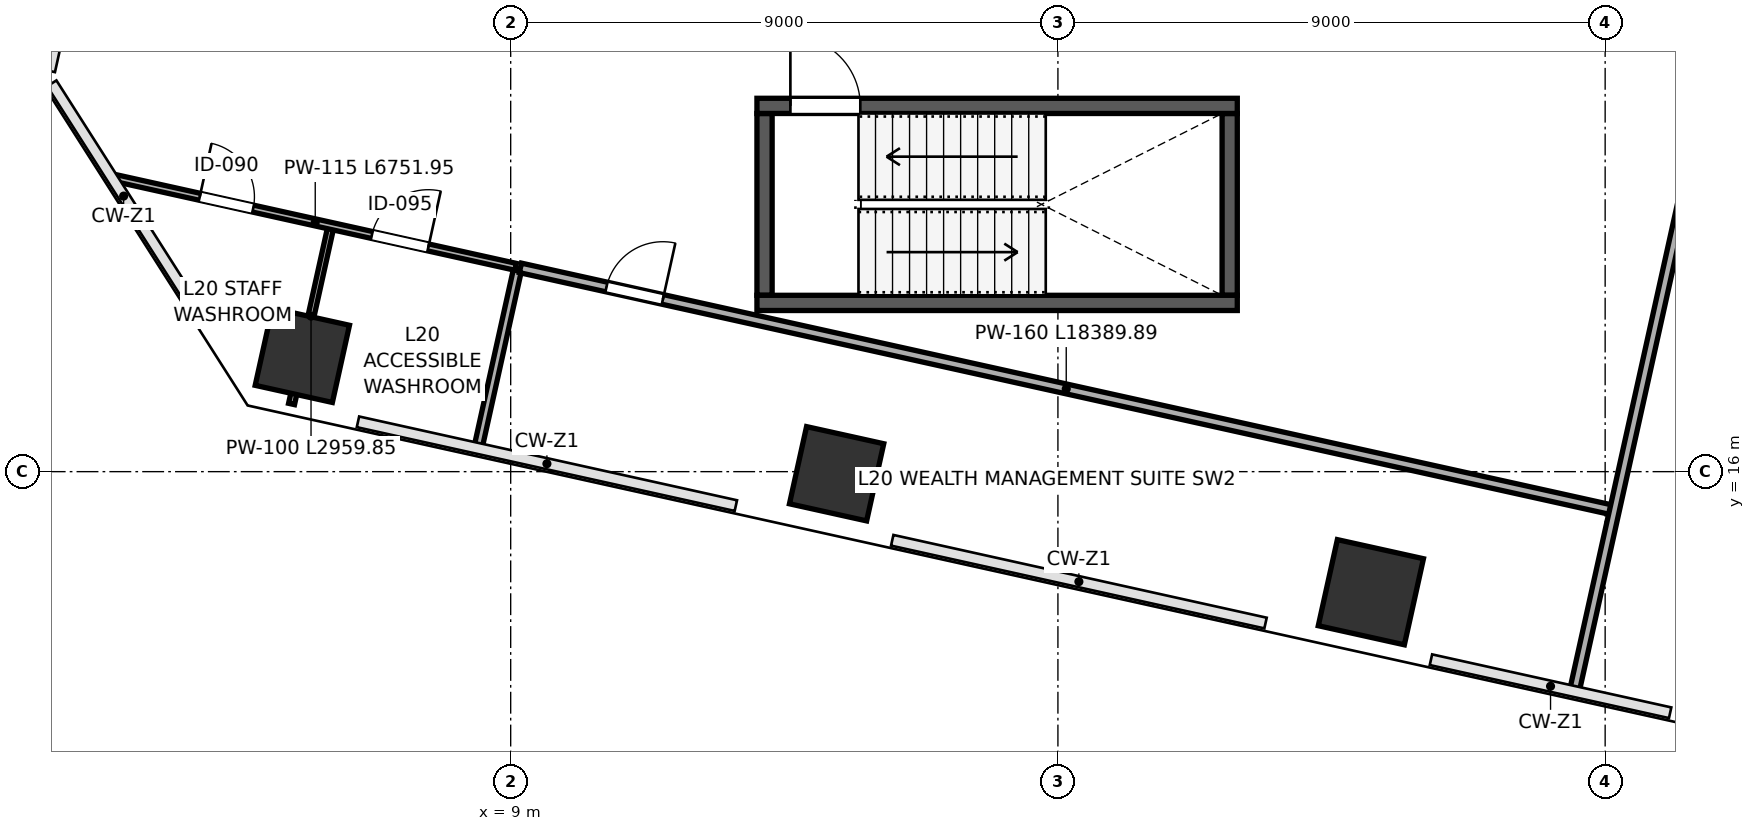
"""IFC4 building model, lengths in metres.
Left out: names, types, materials, properties, quantities, classifications, styles, units other than length and angle.
Written with IfcOpenShell. Run it as: python <this file> out.ifc"""

import sys

from ifc_helpers import new_model, si_unit, direction, frame, frame_2d, origin, origin_2d, place, context, subcontext, project, spatial, rectangle, extrude, clip, halfspace, source, transform, mapped, element, fill, save


model = new_model("IFC4")
c1 = context("Model", 3, precision=1e-05, world=origin(), true_north=direction((0.0, 1.0)))
c2 = subcontext(c1, "Body", "Model", "MODEL_VIEW")
j1 = project(units=[si_unit("LENGTHUNIT", "METRE"), si_unit("PLANEANGLEUNIT", "RADIAN")], contexts=[c1])
p1 = place(None, origin())
s1 = spatial("IfcSite", under=j1, at=p1, CompositionType="ELEMENT")
p2 = place(p1, origin())
s2 = spatial("IfcBuilding", under=s1, at=p2, CompositionType="ELEMENT")
p3 = place(p2, frame((0.0, 0.0, 91.6)))
s3 = spatial("IfcBuildingStorey", under=s2, at=p3, CompositionType="ELEMENT", Elevation=91.6)
p4 = place(p3, frame((5.573, 17.913, 0.0), z_axis=(-0.071818135725, 0.08302708048, 0.993956065069), x_axis=(0.879127163908, 0.475994612668, 0.023760437501)))
e1 = element("IfcColumn", 1, at=p4, inside=s3, PredefinedType="COLUMN", context=c2, shape_type="Clipping", body=[
    clip(clip(extrude(rectangle(XDim=1.3, YDim=1.3, at=origin_2d()), origin(), (0.0, 0.0, 1.0), 4.226), halfspace(frame((0.0, 0.0, 0.086), z_axis=(0.0, 0.0, -1.0), x_axis=(1.0, 0.0, 0.0)), False)), halfspace(frame((0.0, 0.0, 4.139), z_axis=(0.0, 0.0, 1.0), x_axis=(1.0, 0.0, 0.0)), False)),
])
p5 = place(p3, frame((14.36, 15.965, 0.0), z_axis=(-0.082492473705, 0.037859703721, 0.995872298348), x_axis=(0.603128428216, 0.797402134268, 0.019645237133)))
e2 = element("IfcColumn", 2, at=p5, inside=s3, PredefinedType="COLUMN", context=c2, shape_type="Clipping", body=[
    clip(clip(extrude(rectangle(XDim=1.3, YDim=1.3, at=origin_2d()), origin(), (0.0, 0.0, 1.0), 4.217), halfspace(frame((0.0, 0.0, 0.072), z_axis=(0.0, 0.0, -1.0), x_axis=(1.0, 0.0, 0.0)), False)), halfspace(frame((0.0, 0.0, 4.146), z_axis=(0.0, 0.0, 1.0), x_axis=(1.0, 0.0, 0.0)), False)),
])
p6 = place(p3, frame((23.147, 14.017, 0.0), z_axis=(-0.093121130765, -0.007523770665, 0.995626359575), x_axis=(0.136168909588, 0.990479251735, 0.020220779995)))
e3 = element("IfcColumn", 3, at=p6, inside=s3, PredefinedType="COLUMN", context=c2, shape_type="Clipping", body=[
    clip(clip(extrude(rectangle(XDim=1.45, YDim=1.45, at=origin_2d()), origin(), (0.0, 0.0, 1.0), 4.219), halfspace(frame((0.0, 0.0, 0.082), z_axis=(0.0, 0.0, -1.0), x_axis=(1.0, 0.0, 0.0)), False)), halfspace(frame((0.0, 0.0, 4.137), z_axis=(0.0, 0.0, 1.0), x_axis=(1.0, 0.0, 0.0)), False)),
])
for number, where, z_axis, x_axis in (
    (4, (13.175, 18.9, 0.0), (0.0, 0.0, 1.0), (0.0, 1.0, 0.0)),
    (5, (20.825, 18.9, 0.0), (0.0, 0.0, 1.0), (0.0, 1.0, 0.0)),
):
    element("IfcWall", number, at=place(p3, frame(where, z_axis=z_axis, x_axis=x_axis)), inside=s3, PredefinedType="SHEAR", context=c2, shape_type="SweptSolid", body=[
        extrude(rectangle(XDim=2.99, YDim=0.25, at=frame_2d((1.495, 0.0))), origin(), (0.0, 0.0, 1.0), 3.96),
    ])
p7 = place(p3, frame((13.05, 18.775, 0.0), z_axis=(0.0, 0.0, 1.0), x_axis=(1.0, 0.0, 0.0)))
e6 = element("IfcWall", 6, at=p7, inside=s3, PredefinedType="SHEAR", context=c2, shape_type="SweptSolid", body=[
    extrude(rectangle(XDim=7.9, YDim=0.25, at=frame_2d((3.95, 0.0))), origin(), (0.0, 0.0, 1.0), 3.96),
])
p8 = place(p3, frame((13.05, 22.015, 0.0), z_axis=(0.0, 0.0, 1.0), x_axis=(1.0, 0.0, 0.0)))
e7 = element("IfcWall", 7, at=p8, inside=s3, PredefinedType="SHEAR", context=c2, shape_type="SweptSolid", body=[
    extrude(rectangle(XDim=7.9, YDim=0.25, at=frame_2d((3.95, 0.0))), origin(), (0.0, 0.0, 1.0), 3.96),
])
p9 = place(p8, frame((0.55, 0.0, 0.0)))
e8 = element("IfcOpeningElement", 8, at=p9, cuts=e7, PredefinedType="OPENING", context=c2, shape_type="SweptSolid", body=[
    extrude(rectangle(XDim=1.15, YDim=2.2, at=frame_2d((0.575, 1.1))), frame((0.0, 0.135, 0.0), z_axis=(0.0, -1.0, 0.0), x_axis=(1.0, 0.0, 0.0)), (0.0, 0.0, 1.0), 0.27),
])
p10 = place(p3, frame((5.396, 17.113, 0.0), z_axis=(0.0, 0.0, 1.0), x_axis=(0.216441341477, 0.976295624132, 0.0)))
e9 = element("IfcWall", 9, at=p10, inside=s3, PredefinedType="PARTITIONING", context=c2, shape_type="SweptSolid", body=[
    extrude(rectangle(XDim=2.96, YDim=0.1, at=frame_2d((1.48, 0.0))), origin(), (0.0, 0.0, 1.0), 3.095),
])
p11 = place(p3, frame((8.471, 16.431, 0.0), z_axis=(0.0, 0.0, 1.0), x_axis=(0.216441341477, 0.976295624132, 0.0)))
e10 = element("IfcWall", 10, at=p11, inside=s3, PredefinedType="PARTITIONING", context=c2, shape_type="SweptSolid", body=[
    extrude(rectangle(XDim=2.96, YDim=0.135, at=frame_2d((1.48, 0.0))), origin(), (0.0, 0.0, 1.0), 3.095),
])
p12 = place(p3, frame((2.49, 20.83, 0.0), z_axis=(0.0, 0.0, 1.0), x_axis=(0.976294141914, -0.216448027167, 0.0)))
e11 = element("IfcWall", 11, at=p12, inside=s3, PredefinedType="PARTITIONING", context=c2, shape_type="SweptSolid", body=[
    extrude(rectangle(XDim=6.752, YDim=0.115, at=frame_2d((3.376, 0.0))), origin(), (0.0, 0.0, 1.0), 3.96),
])
p13 = place(p12, frame((1.43, 0.0, 0.0)))
e12 = element("IfcOpeningElement", 12, at=p13, cuts=e11, PredefinedType="OPENING", context=c2, shape_type="SweptSolid", body=[
    extrude(rectangle(XDim=0.9, YDim=2.15, at=frame_2d((0.45, 1.075))), frame((0.0, 0.067, 0.0), z_axis=(0.0, -1.0, 0.0), x_axis=(1.0, 0.0, 0.0)), (0.0, 0.0, 1.0), 0.135),
])
p14 = place(p12, frame((4.33, 0.0, 0.0)))
e13 = element("IfcOpeningElement", 13, at=p14, cuts=e11, PredefinedType="OPENING", context=c2, shape_type="SweptSolid", body=[
    extrude(rectangle(XDim=0.95, YDim=2.15, at=frame_2d((0.475, 1.075))), frame((0.0, 0.067, 0.0), z_axis=(0.0, -1.0, 0.0), x_axis=(1.0, 0.0, 0.0)), (0.0, 0.0, 1.0), 0.135),
])
p15 = place(p3, frame((9.16, 19.351, 0.0), z_axis=(0.0, 0.0, 1.0), x_axis=(0.97629657883, -0.216437035106, 0.0)))
e14 = element("IfcWall", 14, at=p15, inside=s3, PredefinedType="PARTITIONING", context=c2, shape_type="SweptSolid", body=[
    extrude(rectangle(XDim=18.39, YDim=0.16, at=frame_2d((9.195, 0.0))), origin(), (0.0, 0.0, 1.0), 3.96),
])
p16 = place(p15, frame((1.45, 0.0, 0.0)))
e15 = element("IfcOpeningElement", 15, at=p16, cuts=e14, PredefinedType="OPENING", context=c2, shape_type="SweptSolid", body=[
    extrude(rectangle(XDim=0.95, YDim=2.15, at=frame_2d((0.475, 1.075))), frame((0.0, 0.09, 0.0), z_axis=(0.0, -1.0, 0.0), x_axis=(1.0, 0.0, 0.0)), (0.0, 0.0, 1.0), 0.18),
])
p17 = place(p3, frame((26.504, 12.433, 0.0), z_axis=(0.0, 0.0, 1.0), x_axis=(0.216434476574, 0.976297146032, 0.0)))
e16 = element("IfcWall", 16, at=p17, inside=s3, PredefinedType="PARTITIONING", context=c2, shape_type="SweptSolid", body=[
    extrude(rectangle(XDim=20.38, YDim=0.16, at=frame_2d((10.19, 0.0))), origin(), (0.0, 0.0, 1.0), 3.96),
])
m1 = source(origin(), c2, "Body", "SweptSolid", [
    extrude(rectangle(XDim=1.15, YDim=2.2, at=frame_2d((0.575, 1.1))), frame((0.0, 0.025, 0.0), z_axis=(0.0, -1.0, 0.0), x_axis=(1.0, 0.0, 0.0)), (0.0, 0.0, 1.0), 0.05),
])
p18 = place(p9, origin())
e17 = element("IfcDoor", 17, at=p18, inside=s3, OperationType="SINGLE_SWING_LEFT", PredefinedType="DOOR", context=c2, shape_type="MappedRepresentation", body=[
    mapped(m1, transform((0.0, 0.0, 0.0), scale=1.0)),
])
fill(e8, e17)
m2 = source(origin(), c2, "Body", "SweptSolid", [
    extrude(rectangle(XDim=0.9, YDim=2.15, at=frame_2d((0.45, 1.075))), frame((0.0, 0.025, 0.0), z_axis=(0.0, -1.0, 0.0), x_axis=(1.0, 0.0, 0.0)), (0.0, 0.0, 1.0), 0.05),
])
p19 = place(p13, origin())
e18 = element("IfcDoor", 18, at=p19, inside=s3, OperationType="SINGLE_SWING_LEFT", PredefinedType="DOOR", context=c2, shape_type="MappedRepresentation", body=[
    mapped(m2, transform((0.0, 0.0, 0.0), scale=1.0)),
])
fill(e12, e18)
m3 = source(origin(), c2, "Body", "SweptSolid", [
    extrude(rectangle(XDim=0.95, YDim=2.15, at=frame_2d((0.475, 1.075))), frame((0.0, 0.025, 0.0), z_axis=(0.0, -1.0, 0.0), x_axis=(1.0, 0.0, 0.0)), (0.0, 0.0, 1.0), 0.05),
])
p20 = place(p14, origin())
e19 = element("IfcDoor", 19, at=p20, inside=s3, OperationType="SINGLE_SWING_RIGHT", PredefinedType="DOOR", context=c2, shape_type="MappedRepresentation", body=[
    mapped(m3, transform((0.0, 0.0, 0.0), scale=1.0)),
])
fill(e13, e19)
m4 = source(origin(), c2, "Body", "SweptSolid", [
    extrude(rectangle(XDim=0.95, YDim=2.15, at=frame_2d((0.475, 1.075))), frame((0.0, 0.025, 0.0), z_axis=(0.0, -1.0, 0.0), x_axis=(1.0, 0.0, 0.0)), (0.0, 0.0, 1.0), 0.05),
])
p21 = place(p16, origin())
e20 = element("IfcDoor", 20, at=p21, inside=s3, OperationType="SINGLE_SWING_RIGHT", PredefinedType="DOOR", context=c2, shape_type="MappedRepresentation", body=[
    mapped(m4, transform((0.0, 0.0, 0.0), scale=1.0)),
])
fill(e15, e20)
save(model, sys.argv[1])
